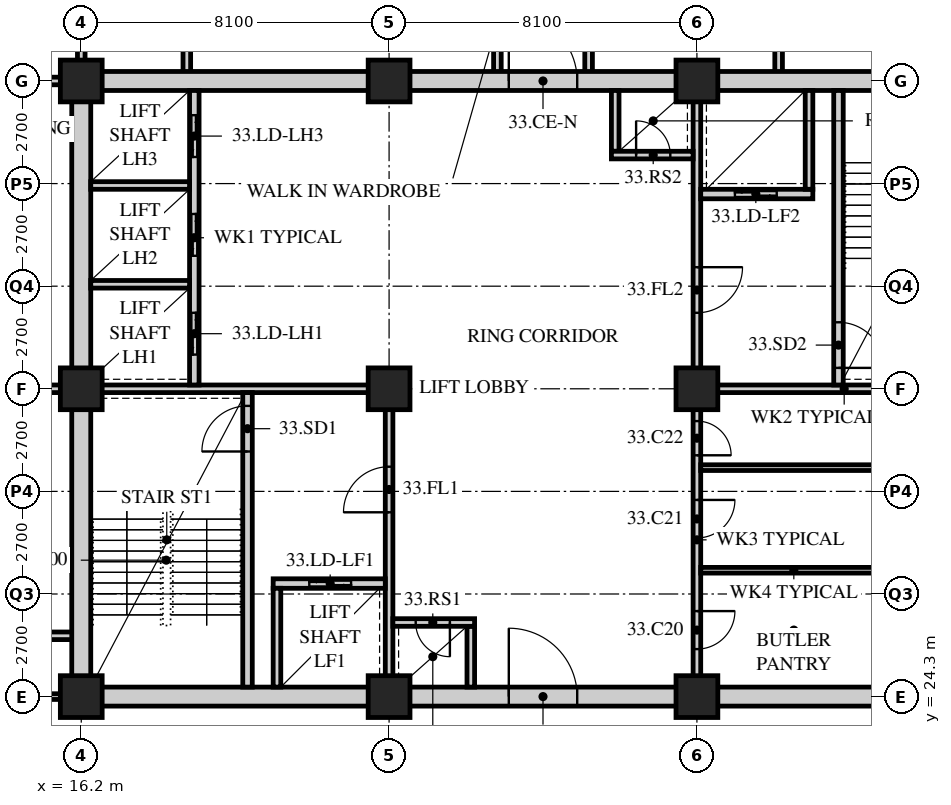
"""IFC4 building model, lengths in metres.
Left out: names, types, materials, properties, quantities, classifications, styles, units other than length and angle.
Written with IfcOpenShell. Run it as: python <this file> out.ifc"""

import sys

from ifc_helpers import new_model, si_unit, direction, frame, frame_2d, origin, origin_2d, place, context, subcontext, project, spatial, rectangle, hollow_rectangle, extrude, element, fill, save


model = new_model("IFC4")
c1 = context("Model", 3, precision=1e-05, world=origin(), true_north=direction((0.0, 1.0)))
c2 = subcontext(c1, "Body", "Model", "MODEL_VIEW")
j1 = project(units=[si_unit("LENGTHUNIT", "METRE"), si_unit("PLANEANGLEUNIT", "RADIAN")], contexts=[c1])
p1 = place(None, origin())
s1 = spatial("IfcSite", under=j1, at=p1, CompositionType="ELEMENT")
p2 = place(p1, origin())
s2 = spatial("IfcBuilding", under=s1, at=p2, CompositionType="ELEMENT")
p3 = place(p2, frame((0.0, 0.0, 130.6)))
s3 = spatial("IfcBuildingStorey", under=s2, at=p3, CompositionType="ELEMENT", Elevation=130.6)
for number, where, z_axis, x_axis in (
    (1, (16.2, 24.3, 0.0), (0.0, 0.0, 1.0), (1.0, 0.0, 0.0)),
    (2, (16.2, 32.4, 0.0), (0.0, 0.0, 1.0), (1.0, 0.0, 0.0)),
    (3, (16.2, 40.5, 0.0), (0.0, 0.0, 1.0), (1.0, 0.0, 0.0)),
    (4, (24.3, 24.3, 0.0), (0.0, 0.0, 1.0), (1.0, 0.0, 0.0)),
    (5, (24.3, 32.4, 0.0), (0.0, 0.0, 1.0), (1.0, 0.0, 0.0)),
    (6, (24.3, 40.5, 0.0), (0.0, 0.0, 1.0), (1.0, 0.0, 0.0)),
    (7, (32.4, 24.3, 0.0), (0.0, 0.0, 1.0), (1.0, 0.0, 0.0)),
    (8, (32.4, 32.4, 0.0), (0.0, 0.0, 1.0), (1.0, 0.0, 0.0)),
    (9, (32.4, 40.5, 0.0), (0.0, 0.0, 1.0), (1.0, 0.0, 0.0)),
):
    element("IfcColumn", number, at=place(p3, frame(where, z_axis=z_axis, x_axis=x_axis)), inside=s3, PredefinedType="COLUMN", context=c2, shape_type="SweptSolid", body=[
        extrude(hollow_rectangle(XDim=1.1, YDim=1.1, WallThickness=0.1, at=origin_2d()), origin(), (0.0, 0.0, 1.0), 3.4),
    ])
p4 = place(p3, frame((9.9, 24.3, 0.0), z_axis=(0.0, 0.0, 1.0), x_axis=(1.0, 0.0, 0.0)))
e10 = element("IfcWall", 10, at=p4, inside=s3, PredefinedType="PARTITIONING", context=c2, shape_type="SweptSolid", body=[
    extrude(rectangle(XDim=6.1, YDim=0.15, at=frame_2d((3.05, 0.0))), origin(), (0.0, 0.0, 1.0), 3.19),
])
for number, where, z_axis, x_axis in (
    (11, (9.9, 32.4, 0.0), (0.0, 0.0, 1.0), (1.0, 0.0, 0.0)),
    (12, (9.9, 25.9, 0.0), (0.0, 0.0, 1.0), (1.0, 0.0, 0.0)),
):
    element("IfcWall", number, at=place(p3, frame(where, z_axis=z_axis, x_axis=x_axis)), inside=s3, PredefinedType="SOLIDWALL", context=c2, shape_type="SweptSolid", body=[
        extrude(rectangle(XDim=6.3, YDim=0.2, at=frame_2d((3.15, 0.0))), origin(), (0.0, 0.0, 1.0), 3.19),
    ])
p5 = place(p3, frame((16.2, 40.5, 0.0), z_axis=(0.0, 0.0, 1.0), x_axis=(0.0, 1.0, 0.0)))
e13 = element("IfcWall", 13, at=p5, inside=s3, PredefinedType="SOLIDWALL", context=c2, shape_type="SweptSolid", body=[
    extrude(rectangle(XDim=3.6, YDim=0.2, at=frame_2d((1.8, 0.0))), origin(), (0.0, 0.0, 1.0), 2.578),
])
for number, where, z_axis, x_axis in (
    (14, (18.978, 44.1, 0.0), (0.0, 0.0, 1.0), (0.0, -1.0, 0.0)),
    (15, (34.55, 44.1, 0.0), (0.0, 0.0, 1.0), (0.0, -1.0, 0.0)),
    (16, (27.15, 40.5, 0.0), (0.0, 0.0, 1.0), (0.0, 1.0, 0.0)),
    (17, (29.55, 40.5, 0.0), (0.0, 0.0, 1.0), (0.0, 1.0, 0.0)),
):
    element("IfcWall", number, at=place(p3, frame(where, z_axis=z_axis, x_axis=x_axis)), inside=s3, PredefinedType="SOLIDWALL", context=c2, shape_type="SweptSolid", body=[
        extrude(rectangle(XDim=3.6, YDim=0.2, at=frame_2d((1.8, 0.0))), origin(), (0.0, 0.0, 1.0), 3.19),
    ])
p6 = place(p3, frame((9.9, 40.5, 0.0), z_axis=(0.0, 0.0, 1.0), x_axis=(1.0, 0.0, 0.0)))
e18 = element("IfcWall", 18, at=p6, inside=s3, PredefinedType="SOLIDWALL", context=c2, shape_type="SweptSolid", body=[
    extrude(rectangle(XDim=6.3, YDim=0.2, at=frame_2d((3.15, 0.0))), origin(), (0.0, 0.0, 1.0), 3.19),
])
p7 = place(p3, frame((15.95, 24.3, 0.0), z_axis=(0.0, 0.0, 1.0), x_axis=(1.0, 0.0, 0.0)))
e19 = element("IfcWall", 19, at=p7, inside=s3, PredefinedType="SOLIDWALL", context=c2, shape_type="SweptSolid", body=[
    extrude(rectangle(XDim=24.8, YDim=0.5, at=frame_2d((12.4, 0.0))), origin(), (0.0, 0.0, 1.0), 2.54),
])
p8 = place(p7, frame((11.5, 0.0, 0.0)))
e20 = element("IfcOpeningElement", 20, at=p8, cuts=e19, PredefinedType="OPENING", context=c2, shape_type="SweptSolid", body=[
    extrude(rectangle(XDim=1.8, YDim=2.4, at=frame_2d((0.9, 1.2))), frame((0.0, 0.26, 0.0), z_axis=(0.0, -1.0, 0.0), x_axis=(1.0, 0.0, 0.0)), (0.0, 0.0, 1.0), 0.52),
])
p9 = place(p3, frame((15.95, 40.5, 0.0), z_axis=(0.0, 0.0, 1.0), x_axis=(1.0, 0.0, 0.0)))
e21 = element("IfcWall", 21, at=p9, inside=s3, PredefinedType="SOLIDWALL", context=c2, shape_type="SweptSolid", body=[
    extrude(rectangle(XDim=24.8, YDim=0.5, at=frame_2d((12.4, 0.0))), origin(), (0.0, 0.0, 1.0), 2.54),
])
p10 = place(p9, frame((11.5, 0.0, 0.0)))
e22 = element("IfcOpeningElement", 22, at=p10, cuts=e21, PredefinedType="OPENING", context=c2, shape_type="SweptSolid", body=[
    extrude(rectangle(XDim=1.8, YDim=2.4, at=frame_2d((0.9, 1.2))), frame((0.0, 0.26, 0.0), z_axis=(0.0, -1.0, 0.0), x_axis=(1.0, 0.0, 0.0)), (0.0, 0.0, 1.0), 0.52),
])
p11 = place(p3, frame((16.2, 24.55, 0.0), z_axis=(0.0, 0.0, 1.0), x_axis=(0.0, 1.0, 0.0)))
e23 = element("IfcWall", 23, at=p11, inside=s3, PredefinedType="SOLIDWALL", context=c2, shape_type="SweptSolid", body=[
    extrude(rectangle(XDim=15.7, YDim=0.5, at=frame_2d((7.85, 0.0))), origin(), (0.0, 0.0, 1.0), 2.578),
])
p12 = place(p3, frame((16.45, 32.4, 0.0), z_axis=(0.0, 0.0, 1.0), x_axis=(1.0, 0.0, 0.0)))
e24 = element("IfcWall", 24, at=p12, inside=s3, PredefinedType="SOLIDWALL", context=c2, shape_type="SweptSolid", body=[
    extrude(rectangle(XDim=7.95, YDim=0.2, at=frame_2d((3.975, 0.0))), origin(), (0.0, 0.0, 1.0), 2.578),
])
p13 = place(p3, frame((24.3, 24.55, 0.0), z_axis=(0.0, 0.0, 1.0), x_axis=(0.0, 1.0, 0.0)))
e25 = element("IfcWall", 25, at=p13, inside=s3, PredefinedType="SOLIDWALL", context=c2, shape_type="SweptSolid", body=[
    extrude(rectangle(XDim=7.75, YDim=0.2, at=frame_2d((3.875, 0.0))), origin(), (0.0, 0.0, 1.0), 2.578),
])
p14 = place(p13, frame((4.6, 0.0, 0.0)))
e26 = element("IfcOpeningElement", 26, at=p14, cuts=e25, PredefinedType="OPENING", context=c2, shape_type="SweptSolid", body=[
    extrude(rectangle(XDim=1.2, YDim=2.1, at=frame_2d((0.6, 1.05))), frame((0.0, 0.11, 0.0), z_axis=(0.0, -1.0, 0.0), x_axis=(1.0, 0.0, 0.0)), (0.0, 0.0, 1.0), 0.22),
])
p15 = place(p3, frame((20.575, 24.55, 0.0), z_axis=(0.0, 0.0, 1.0), x_axis=(0.0, 1.0, 0.0)))
e27 = element("IfcWall", 27, at=p15, inside=s3, PredefinedType="SOLIDWALL", context=c2, shape_type="SweptSolid", body=[
    extrude(rectangle(XDim=7.75, YDim=0.25, at=frame_2d((3.875, 0.0))), origin(), (0.0, 0.0, 1.0), 3.19),
])
p16 = place(p15, frame((6.2, 0.0, 0.0)))
e28 = element("IfcOpeningElement", 28, at=p16, cuts=e27, PredefinedType="OPENING", context=c2, shape_type="SweptSolid", body=[
    extrude(rectangle(XDim=1.2, YDim=2.1, at=frame_2d((0.6, 1.05))), frame((0.0, 0.135, 0.0), z_axis=(0.0, -1.0, 0.0), x_axis=(1.0, 0.0, 0.0)), (0.0, 0.0, 1.0), 0.27),
])
p17 = place(p3, frame((21.25, 27.275, 0.0), z_axis=(0.0, 0.0, 1.0), x_axis=(1.0, 0.0, 0.0)))
e29 = element("IfcWall", 29, at=p17, inside=s3, PredefinedType="SOLIDWALL", context=c2, shape_type="SweptSolid", body=[
    extrude(rectangle(XDim=2.95, YDim=0.25, at=frame_2d((1.475, 0.0))), origin(), (0.0, 0.0, 1.0), 3.19),
])
p18 = place(p17, frame((0.95, 0.0, 0.0)))
e30 = element("IfcOpeningElement", 30, at=p18, cuts=e29, PredefinedType="OPENING", context=c2, shape_type="SweptSolid", body=[
    extrude(rectangle(XDim=1.1, YDim=2.4, at=frame_2d((0.55, 1.2))), frame((0.0, 0.135, 0.0), z_axis=(0.0, -1.0, 0.0), x_axis=(1.0, 0.0, 0.0)), (0.0, 0.0, 1.0), 0.27),
])
p19 = place(p3, frame((21.35, 24.55, 0.0), z_axis=(0.0, 0.0, 1.0), x_axis=(0.0, 1.0, 0.0)))
e31 = element("IfcWall", 31, at=p19, inside=s3, PredefinedType="SOLIDWALL", context=c2, shape_type="SweptSolid", body=[
    extrude(rectangle(XDim=2.6, YDim=0.2, at=frame_2d((1.3, 0.0))), origin(), (0.0, 0.0, 1.0), 3.19),
])
p20 = place(p3, frame((19.175, 32.5, 0.0), z_axis=(0.0, 0.0, 1.0), x_axis=(0.0, 1.0, 0.0)))
e32 = element("IfcWall", 32, at=p20, inside=s3, PredefinedType="SOLIDWALL", context=c2, shape_type="SweptSolid", body=[
    extrude(rectangle(XDim=7.75, YDim=0.25, at=frame_2d((3.875, 0.0))), origin(), (0.0, 0.0, 1.0), 3.19),
])
p21 = place(p20, frame((0.8, 0.0, 0.0)))
e33 = element("IfcOpeningElement", 33, at=p21, cuts=e32, PredefinedType="OPENING", context=c2, shape_type="SweptSolid", body=[
    extrude(rectangle(XDim=1.1, YDim=2.4, at=frame_2d((0.55, 1.2))), frame((0.0, 0.135, 0.0), z_axis=(0.0, -1.0, 0.0), x_axis=(1.0, 0.0, 0.0)), (0.0, 0.0, 1.0), 0.27),
])
p22 = place(p20, frame((3.4, 0.0, 0.0)))
e34 = element("IfcOpeningElement", 34, at=p22, cuts=e32, PredefinedType="OPENING", context=c2, shape_type="SweptSolid", body=[
    extrude(rectangle(XDim=1.1, YDim=2.4, at=frame_2d((0.55, 1.2))), frame((0.0, 0.135, 0.0), z_axis=(0.0, -1.0, 0.0), x_axis=(1.0, 0.0, 0.0)), (0.0, 0.0, 1.0), 0.27),
])
p23 = place(p20, frame((6.0, 0.0, 0.0)))
e35 = element("IfcOpeningElement", 35, at=p23, cuts=e32, PredefinedType="OPENING", context=c2, shape_type="SweptSolid", body=[
    extrude(rectangle(XDim=1.1, YDim=2.4, at=frame_2d((0.55, 1.2))), frame((0.0, 0.135, 0.0), z_axis=(0.0, -1.0, 0.0), x_axis=(1.0, 0.0, 0.0)), (0.0, 0.0, 1.0), 0.27),
])
for number, where, z_axis, x_axis in (
    (36, (16.45, 35.15, 0.0), (0.0, 0.0, 1.0), (1.0, 0.0, 0.0)),
    (37, (16.45, 37.75, 0.0), (0.0, 0.0, 1.0), (1.0, 0.0, 0.0)),
):
    element("IfcWall", number, at=place(p3, frame(where, z_axis=z_axis, x_axis=x_axis)), inside=s3, PredefinedType="SOLIDWALL", context=c2, shape_type="SweptSolid", body=[
        extrude(rectangle(XDim=2.6, YDim=0.2, at=frame_2d((1.3, 0.0))), origin(), (0.0, 0.0, 1.0), 3.19),
    ])
p24 = place(p3, frame((26.45, 24.55, 0.0), z_axis=(0.0, 0.0, 1.0), x_axis=(0.0, 1.0, 0.0)))
e38 = element("IfcWall", 38, at=p24, inside=s3, PredefinedType="SOLIDWALL", context=c2, shape_type="SweptSolid", body=[
    extrude(rectangle(XDim=1.6, YDim=0.2, at=frame_2d((0.8, 0.0))), origin(), (0.0, 0.0, 1.0), 3.19),
])
p25 = place(p3, frame((24.4, 26.25, 0.0), z_axis=(0.0, 0.0, 1.0), x_axis=(1.0, 0.0, 0.0)))
e39 = element("IfcWall", 39, at=p25, inside=s3, PredefinedType="SOLIDWALL", context=c2, shape_type="SweptSolid", body=[
    extrude(rectangle(XDim=2.15, YDim=0.2, at=frame_2d((1.075, 0.0))), origin(), (0.0, 0.0, 1.0), 3.19),
])
p26 = place(p25, frame((0.6, 0.0, 0.0)))
e40 = element("IfcOpeningElement", 40, at=p26, cuts=e39, PredefinedType="OPENING", context=c2, shape_type="SweptSolid", body=[
    extrude(rectangle(XDim=0.9, YDim=2.1, at=frame_2d((0.45, 1.05))), frame((0.0, 0.11, 0.0), z_axis=(0.0, -1.0, 0.0), x_axis=(1.0, 0.0, 0.0)), (0.0, 0.0, 1.0), 0.22),
])
p27 = place(p3, frame((32.3, 32.4, 0.0), z_axis=(0.0, 0.0, 1.0), x_axis=(1.0, 0.0, 0.0)))
e41 = element("IfcWall", 41, at=p27, inside=s3, PredefinedType="SOLIDWALL", context=c2, shape_type="SweptSolid", body=[
    extrude(rectangle(XDim=7.95, YDim=0.2, at=frame_2d((3.975, 0.0))), origin(), (0.0, 0.0, 1.0), 2.578),
])
p28 = place(p3, frame((32.4, 32.5, 0.0), z_axis=(0.0, 0.0, 1.0), x_axis=(0.0, 1.0, 0.0)))
e42 = element("IfcWall", 42, at=p28, inside=s3, PredefinedType="SOLIDWALL", context=c2, shape_type="SweptSolid", body=[
    extrude(rectangle(XDim=7.75, YDim=0.2, at=frame_2d((3.875, 0.0))), origin(), (0.0, 0.0, 1.0), 2.578),
])
p29 = place(p28, frame((1.9, 0.0, 0.0)))
e43 = element("IfcOpeningElement", 43, at=p29, cuts=e42, PredefinedType="OPENING", context=c2, shape_type="SweptSolid", body=[
    extrude(rectangle(XDim=1.2, YDim=2.1, at=frame_2d((0.6, 1.05))), frame((0.0, 0.11, 0.0), z_axis=(0.0, -1.0, 0.0), x_axis=(1.0, 0.0, 0.0)), (0.0, 0.0, 1.0), 0.22),
])
p30 = place(p3, frame((36.125, 32.5, 0.0), z_axis=(0.0, 0.0, 1.0), x_axis=(0.0, 1.0, 0.0)))
e44 = element("IfcWall", 44, at=p30, inside=s3, PredefinedType="SOLIDWALL", context=c2, shape_type="SweptSolid", body=[
    extrude(rectangle(XDim=7.75, YDim=0.25, at=frame_2d((3.875, 0.0))), origin(), (0.0, 0.0, 1.0), 3.19),
])
p31 = place(p30, frame((0.45, 0.0, 0.0)))
e45 = element("IfcOpeningElement", 45, at=p31, cuts=e44, PredefinedType="OPENING", context=c2, shape_type="SweptSolid", body=[
    extrude(rectangle(XDim=1.2, YDim=2.1, at=frame_2d((0.6, 1.05))), frame((0.0, 0.135, 0.0), z_axis=(0.0, -1.0, 0.0), x_axis=(1.0, 0.0, 0.0)), (0.0, 0.0, 1.0), 0.27),
])
p32 = place(p3, frame((32.5, 37.525, 0.0), z_axis=(0.0, 0.0, 1.0), x_axis=(1.0, 0.0, 0.0)))
e46 = element("IfcWall", 46, at=p32, inside=s3, PredefinedType="SOLIDWALL", context=c2, shape_type="SweptSolid", body=[
    extrude(rectangle(XDim=2.95, YDim=0.25, at=frame_2d((1.475, 0.0))), origin(), (0.0, 0.0, 1.0), 3.19),
])
p33 = place(p32, frame((0.9, 0.0, 0.0)))
e47 = element("IfcOpeningElement", 47, at=p33, cuts=e46, PredefinedType="OPENING", context=c2, shape_type="SweptSolid", body=[
    extrude(rectangle(XDim=1.1, YDim=2.4, at=frame_2d((0.55, 1.2))), frame((0.0, 0.135, 0.0), z_axis=(0.0, -1.0, 0.0), x_axis=(1.0, 0.0, 0.0)), (0.0, 0.0, 1.0), 0.27),
])
p34 = place(p3, frame((35.35, 37.65, 0.0), z_axis=(0.0, 0.0, 1.0), x_axis=(0.0, 1.0, 0.0)))
e48 = element("IfcWall", 48, at=p34, inside=s3, PredefinedType="SOLIDWALL", context=c2, shape_type="SweptSolid", body=[
    extrude(rectangle(XDim=2.6, YDim=0.2, at=frame_2d((1.3, 0.0))), origin(), (0.0, 0.0, 1.0), 3.19),
])
p35 = place(p3, frame((30.25, 38.65, 0.0), z_axis=(0.0, 0.0, 1.0), x_axis=(0.0, 1.0, 0.0)))
e49 = element("IfcWall", 49, at=p35, inside=s3, PredefinedType="SOLIDWALL", context=c2, shape_type="SweptSolid", body=[
    extrude(rectangle(XDim=1.6, YDim=0.2, at=frame_2d((0.8, 0.0))), origin(), (0.0, 0.0, 1.0), 3.19),
])
p36 = place(p3, frame((30.15, 38.55, 0.0), z_axis=(0.0, 0.0, 1.0), x_axis=(1.0, 0.0, 0.0)))
e50 = element("IfcWall", 50, at=p36, inside=s3, PredefinedType="SOLIDWALL", context=c2, shape_type="SweptSolid", body=[
    extrude(rectangle(XDim=2.15, YDim=0.2, at=frame_2d((1.075, 0.0))), origin(), (0.0, 0.0, 1.0), 3.19),
])
p37 = place(p36, frame((0.65, 0.0, 0.0)))
e51 = element("IfcOpeningElement", 51, at=p37, cuts=e50, PredefinedType="OPENING", context=c2, shape_type="SweptSolid", body=[
    extrude(rectangle(XDim=0.9, YDim=2.1, at=frame_2d((0.45, 1.05))), frame((0.0, 0.11, 0.0), z_axis=(0.0, -1.0, 0.0), x_axis=(1.0, 0.0, 0.0)), (0.0, 0.0, 1.0), 0.22),
])
p38 = place(p3, frame((32.4, 24.55, 0.0), z_axis=(0.0, 0.0, 1.0), x_axis=(0.0, 1.0, 0.0)))
e52 = element("IfcWall", 52, at=p38, inside=s3, PredefinedType="PARTITIONING", context=c2, shape_type="SweptSolid", body=[
    extrude(rectangle(XDim=7.75, YDim=0.2, at=frame_2d((3.875, 0.0))), origin(), (0.0, 0.0, 1.0), 2.578),
])
p39 = place(p38, frame((1.0, 0.0, 0.0)))
e53 = element("IfcOpeningElement", 53, at=p39, cuts=e52, PredefinedType="OPENING", context=c2, shape_type="SweptSolid", body=[
    extrude(rectangle(XDim=1.0, YDim=2.1, at=frame_2d((0.5, 1.05))), frame((0.0, 0.11, 0.0), z_axis=(0.0, -1.0, 0.0), x_axis=(1.0, 0.0, 0.0)), (0.0, 0.0, 1.0), 0.22),
])
p40 = place(p38, frame((3.925, 0.0, 0.0)))
e54 = element("IfcOpeningElement", 54, at=p40, cuts=e52, PredefinedType="OPENING", context=c2, shape_type="SweptSolid", body=[
    extrude(rectangle(XDim=1.0, YDim=2.1, at=frame_2d((0.5, 1.05))), frame((0.0, 0.11, 0.0), z_axis=(0.0, -1.0, 0.0), x_axis=(1.0, 0.0, 0.0)), (0.0, 0.0, 1.0), 0.22),
])
p41 = place(p38, frame((6.1, 0.0, 0.0)))
e55 = element("IfcOpeningElement", 55, at=p41, cuts=e52, PredefinedType="OPENING", context=c2, shape_type="SweptSolid", body=[
    extrude(rectangle(XDim=0.9, YDim=2.1, at=frame_2d((0.45, 1.05))), frame((0.0, 0.11, 0.0), z_axis=(0.0, -1.0, 0.0), x_axis=(1.0, 0.0, 0.0)), (0.0, 0.0, 1.0), 0.22),
])
for number, where, z_axis, x_axis in (
    (56, (32.5, 27.625, 0.0), (0.0, 0.0, 1.0), (1.0, 0.0, 0.0)),
    (57, (32.5, 30.325, 0.0), (0.0, 0.0, 1.0), (1.0, 0.0, 0.0)),
):
    element("IfcWall", number, at=place(p3, frame(where, z_axis=z_axis, x_axis=x_axis)), inside=s3, PredefinedType="PARTITIONING", context=c2, shape_type="SweptSolid", body=[
        extrude(rectangle(XDim=4.9, YDim=0.15, at=frame_2d((2.45, 0.0))), origin(), (0.0, 0.0, 1.0), 3.19),
    ])
p42 = place(p39, origin())
e58 = element("IfcDoor", 58, at=p42, inside=s3, OperationType="SINGLE_SWING_LEFT", PredefinedType="DOOR", context=c2, shape_type="SweptSolid", body=[
    extrude(rectangle(XDim=1.0, YDim=2.1, at=frame_2d((0.5, 1.05))), frame((0.0, 0.025, 0.0), z_axis=(0.0, -1.0, 0.0), x_axis=(1.0, 0.0, 0.0)), (0.0, 0.0, 1.0), 0.05),
])
fill(e53, e58)
p43 = place(p40, origin())
e59 = element("IfcDoor", 59, at=p43, inside=s3, OperationType="SINGLE_SWING_LEFT", PredefinedType="DOOR", context=c2, shape_type="SweptSolid", body=[
    extrude(rectangle(XDim=1.0, YDim=2.1, at=frame_2d((0.5, 1.05))), frame((0.0, 0.025, 0.0), z_axis=(0.0, -1.0, 0.0), x_axis=(1.0, 0.0, 0.0)), (0.0, 0.0, 1.0), 0.05),
])
fill(e54, e59)
p44 = place(p41, origin())
e60 = element("IfcDoor", 60, at=p44, inside=s3, OperationType="SINGLE_SWING_RIGHT", PredefinedType="DOOR", context=c2, shape_type="SweptSolid", body=[
    extrude(rectangle(XDim=0.9, YDim=2.1, at=frame_2d((0.45, 1.05))), frame((0.0, 0.025, 0.0), z_axis=(0.0, -1.0, 0.0), x_axis=(1.0, 0.0, 0.0)), (0.0, 0.0, 1.0), 0.05),
])
fill(e55, e60)
p45 = place(p16, origin())
e61 = element("IfcDoor", 61, at=p45, inside=s3, OperationType="SINGLE_SWING_LEFT", PredefinedType="DOOR", context=c2, shape_type="SweptSolid", body=[
    extrude(rectangle(XDim=1.2, YDim=2.1, at=frame_2d((0.6, 1.05))), frame((0.0, 0.025, 0.0), z_axis=(0.0, -1.0, 0.0), x_axis=(1.0, 0.0, 0.0)), (0.0, 0.0, 1.0), 0.05),
])
fill(e28, e61)
p46 = place(p14, origin())
e62 = element("IfcDoor", 62, at=p46, inside=s3, OperationType="SINGLE_SWING_LEFT", PredefinedType="DOOR", context=c2, shape_type="SweptSolid", body=[
    extrude(rectangle(XDim=1.2, YDim=2.1, at=frame_2d((0.6, 1.05))), frame((0.0, 0.025, 0.0), z_axis=(0.0, -1.0, 0.0), x_axis=(1.0, 0.0, 0.0)), (0.0, 0.0, 1.0), 0.05),
])
fill(e26, e62)
p47 = place(p26, origin())
e63 = element("IfcDoor", 63, at=p47, inside=s3, OperationType="SINGLE_SWING_LEFT", PredefinedType="DOOR", context=c2, shape_type="SweptSolid", body=[
    extrude(rectangle(XDim=0.9, YDim=2.1, at=frame_2d((0.45, 1.05))), frame((0.0, 0.025, 0.0), z_axis=(0.0, -1.0, 0.0), x_axis=(1.0, 0.0, 0.0)), (0.0, 0.0, 1.0), 0.05),
])
fill(e40, e63)
p48 = place(p31, origin())
e64 = element("IfcDoor", 64, at=p48, inside=s3, OperationType="SINGLE_SWING_RIGHT", PredefinedType="DOOR", context=c2, shape_type="SweptSolid", body=[
    extrude(rectangle(XDim=1.2, YDim=2.1, at=frame_2d((0.6, 1.05))), frame((0.0, 0.025, 0.0), z_axis=(0.0, -1.0, 0.0), x_axis=(1.0, 0.0, 0.0)), (0.0, 0.0, 1.0), 0.05),
])
fill(e45, e64)
p49 = place(p29, origin())
e65 = element("IfcDoor", 65, at=p49, inside=s3, OperationType="SINGLE_SWING_LEFT", PredefinedType="DOOR", context=c2, shape_type="SweptSolid", body=[
    extrude(rectangle(XDim=1.2, YDim=2.1, at=frame_2d((0.6, 1.05))), frame((0.0, 0.025, 0.0), z_axis=(0.0, -1.0, 0.0), x_axis=(1.0, 0.0, 0.0)), (0.0, 0.0, 1.0), 0.05),
])
fill(e43, e65)
p50 = place(p37, origin())
e66 = element("IfcDoor", 66, at=p50, inside=s3, OperationType="SINGLE_SWING_LEFT", PredefinedType="DOOR", context=c2, shape_type="SweptSolid", body=[
    extrude(rectangle(XDim=0.9, YDim=2.1, at=frame_2d((0.45, 1.05))), frame((0.0, 0.025, 0.0), z_axis=(0.0, -1.0, 0.0), x_axis=(1.0, 0.0, 0.0)), (0.0, 0.0, 1.0), 0.05),
])
fill(e51, e66)
p51 = place(p21, origin())
e67 = element("IfcDoor", 67, at=p51, inside=s3, OperationType="DOUBLE_DOOR_SLIDING", PredefinedType="DOOR", context=c2, shape_type="SweptSolid", body=[
    extrude(rectangle(XDim=1.1, YDim=2.4, at=frame_2d((0.55, 1.2))), frame((0.0, 0.025, 0.0), z_axis=(0.0, -1.0, 0.0), x_axis=(1.0, 0.0, 0.0)), (0.0, 0.0, 1.0), 0.05),
])
fill(e33, e67)
p52 = place(p22, origin())
e68 = element("IfcDoor", 68, at=p52, inside=s3, OperationType="DOUBLE_DOOR_SLIDING", PredefinedType="DOOR", context=c2, shape_type="SweptSolid", body=[
    extrude(rectangle(XDim=1.1, YDim=2.4, at=frame_2d((0.55, 1.2))), frame((0.0, 0.025, 0.0), z_axis=(0.0, -1.0, 0.0), x_axis=(1.0, 0.0, 0.0)), (0.0, 0.0, 1.0), 0.05),
])
fill(e34, e68)
p53 = place(p23, origin())
e69 = element("IfcDoor", 69, at=p53, inside=s3, OperationType="DOUBLE_DOOR_SLIDING", PredefinedType="DOOR", context=c2, shape_type="SweptSolid", body=[
    extrude(rectangle(XDim=1.1, YDim=2.4, at=frame_2d((0.55, 1.2))), frame((0.0, 0.025, 0.0), z_axis=(0.0, -1.0, 0.0), x_axis=(1.0, 0.0, 0.0)), (0.0, 0.0, 1.0), 0.05),
])
fill(e35, e69)
p54 = place(p18, origin())
e70 = element("IfcDoor", 70, at=p54, inside=s3, OperationType="DOUBLE_DOOR_SLIDING", PredefinedType="DOOR", context=c2, shape_type="SweptSolid", body=[
    extrude(rectangle(XDim=1.1, YDim=2.4, at=frame_2d((0.55, 1.2))), frame((0.0, 0.025, 0.0), z_axis=(0.0, -1.0, 0.0), x_axis=(1.0, 0.0, 0.0)), (0.0, 0.0, 1.0), 0.05),
])
fill(e30, e70)
p55 = place(p33, origin())
e71 = element("IfcDoor", 71, at=p55, inside=s3, OperationType="DOUBLE_DOOR_SLIDING", PredefinedType="DOOR", context=c2, shape_type="SweptSolid", body=[
    extrude(rectangle(XDim=1.1, YDim=2.4, at=frame_2d((0.55, 1.2))), frame((0.0, 0.025, 0.0), z_axis=(0.0, -1.0, 0.0), x_axis=(1.0, 0.0, 0.0)), (0.0, 0.0, 1.0), 0.05),
])
fill(e47, e71)
p56 = place(p8, origin())
e72 = element("IfcDoor", 72, at=p56, inside=s3, OperationType="DOUBLE_DOOR_SINGLE_SWING", PredefinedType="DOOR", context=c2, shape_type="SweptSolid", body=[
    extrude(rectangle(XDim=1.8, YDim=2.4, at=frame_2d((0.9, 1.2))), frame((0.0, 0.025, 0.0), z_axis=(0.0, -1.0, 0.0), x_axis=(1.0, 0.0, 0.0)), (0.0, 0.0, 1.0), 0.05),
])
fill(e20, e72)
p57 = place(p10, origin())
e73 = element("IfcDoor", 73, at=p57, inside=s3, OperationType="DOUBLE_DOOR_SINGLE_SWING", PredefinedType="DOOR", context=c2, shape_type="SweptSolid", body=[
    extrude(rectangle(XDim=1.8, YDim=2.4, at=frame_2d((0.9, 1.2))), frame((0.0, 0.025, 0.0), z_axis=(0.0, -1.0, 0.0), x_axis=(1.0, 0.0, 0.0)), (0.0, 0.0, 1.0), 0.05),
])
fill(e22, e73)
save(model, sys.argv[1])
